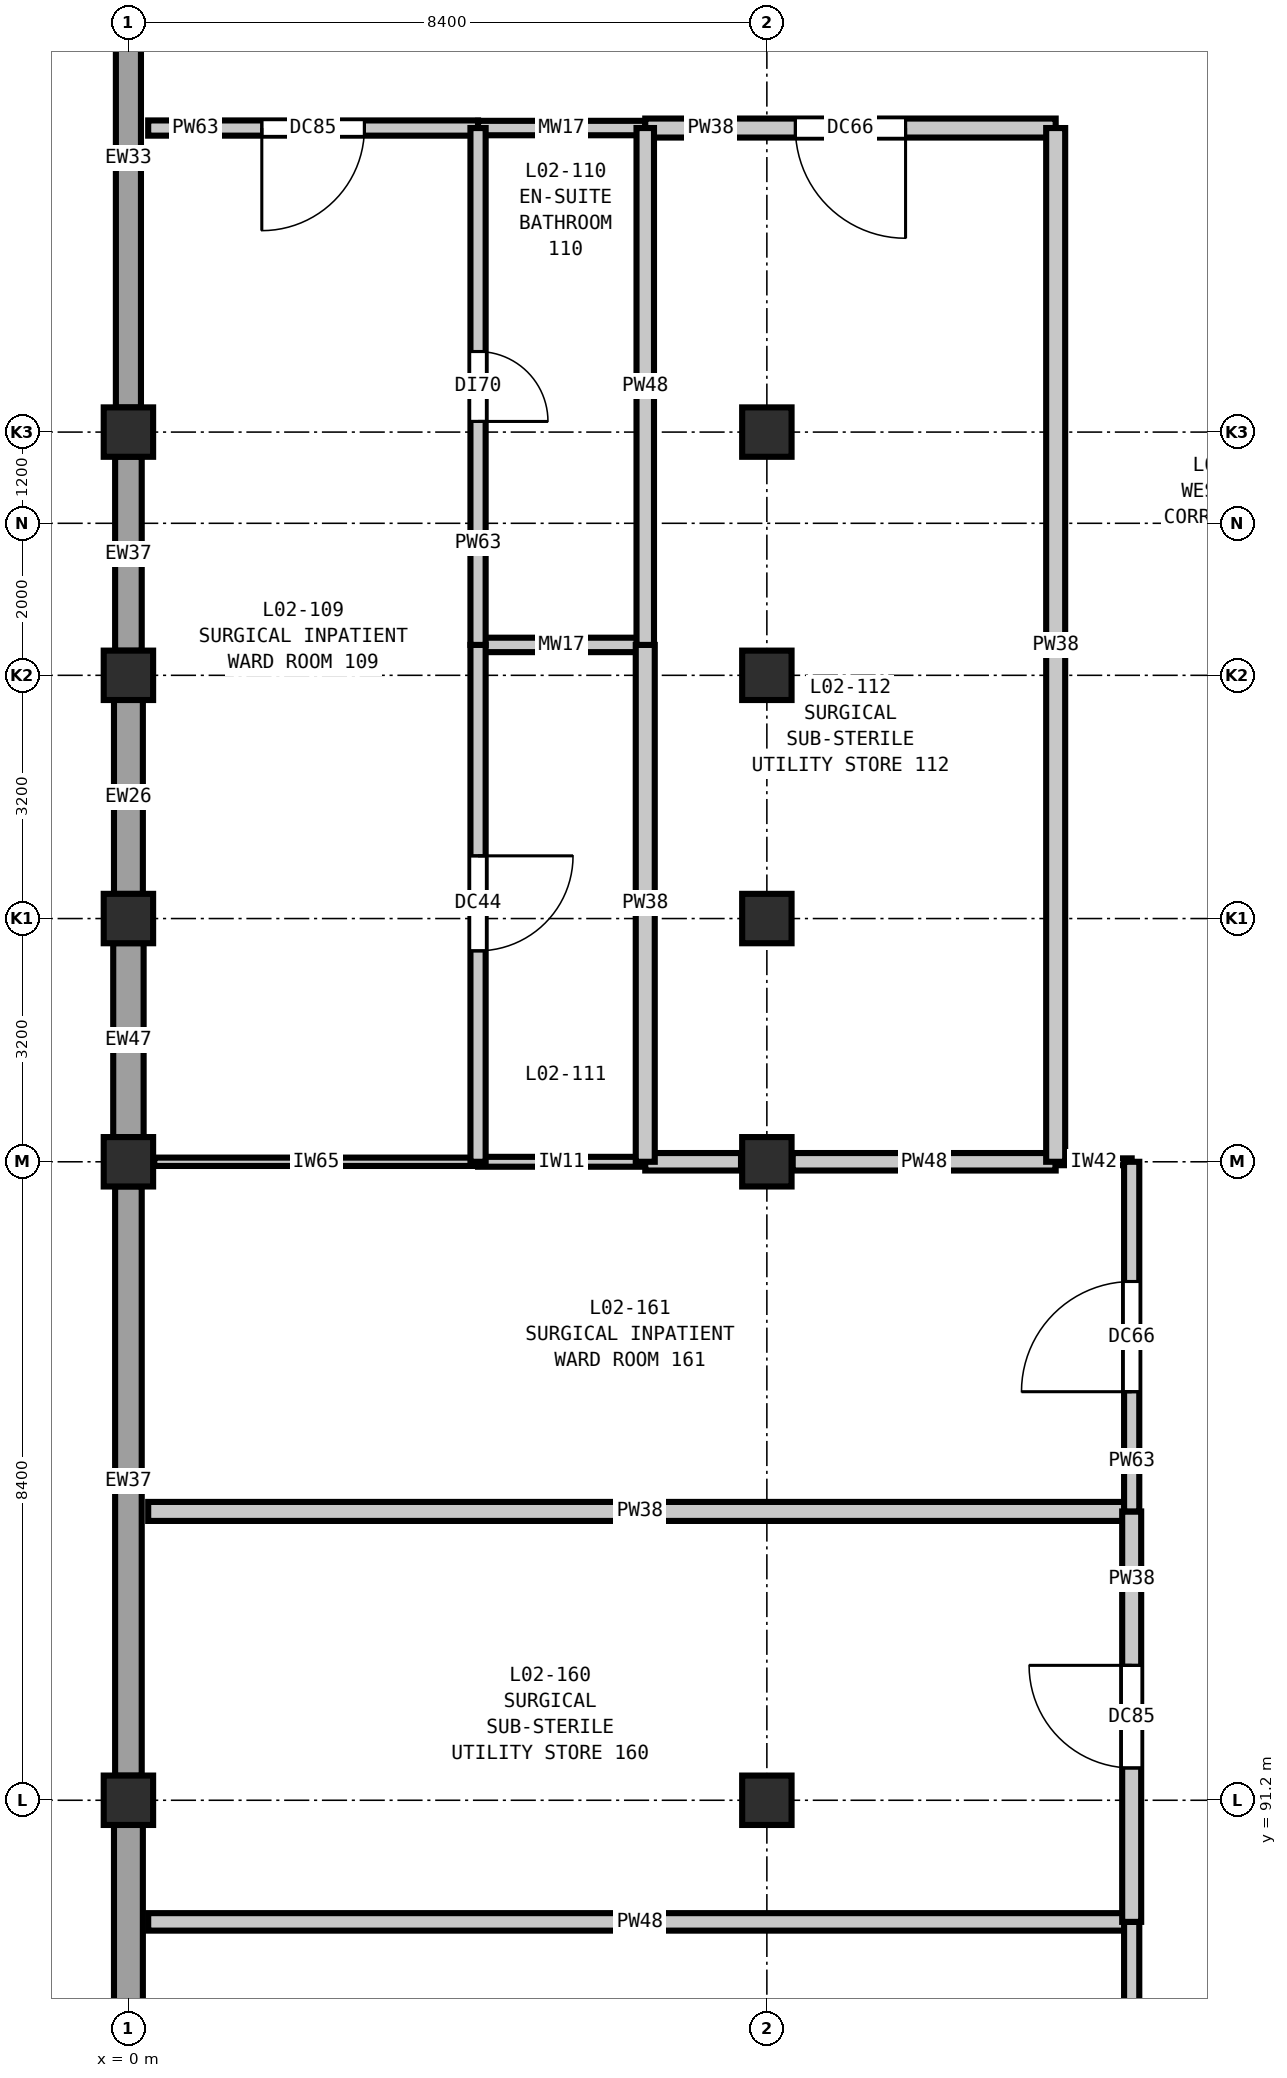
"""IFC4 building model, lengths in metres.
Left out: names, types, materials, properties, quantities, classifications, styles, units other than length and angle.
Written with IfcOpenShell. Run it as: python <this file> out.ifc"""

import sys

from ifc_helpers import new_model, si_unit, direction, frame, frame_2d, origin, origin_2d, place, context, subcontext, project, spatial, rectangle, extrude, element, fill, save


model = new_model("IFC4")
c1 = context("Model", 3, precision=1e-05, world=origin(), true_north=direction((0.0, 1.0)))
c2 = subcontext(c1, "Body", "Model", "MODEL_VIEW")
j1 = project(units=[si_unit("LENGTHUNIT", "METRE"), si_unit("PLANEANGLEUNIT", "RADIAN")], contexts=[c1])
p1 = place(None, origin())
s1 = spatial("IfcSite", under=j1, at=p1, CompositionType="ELEMENT")
p2 = place(p1, origin())
s2 = spatial("IfcBuilding", under=s1, at=p2, CompositionType="ELEMENT")
p3 = place(p2, frame((0.0, 0.0, 10.8)))
s3 = spatial("IfcBuildingStorey", under=s2, at=p3, CompositionType="ELEMENT", Elevation=10.8)
for number, where, z_axis, x_axis in (
    (1, (0.0, 91.2, 0.0), (0.0, 0.0, 1.0), (1.0, 0.0, 0.0)),
    (2, (0.0, 99.6, 0.0), (0.0, 0.0, 1.0), (1.0, 0.0, 0.0)),
    (3, (0.0, 102.8, 0.0), (0.0, 0.0, 1.0), (1.0, 0.0, 0.0)),
    (4, (0.0, 106.0, 0.0), (0.0, 0.0, 1.0), (1.0, 0.0, 0.0)),
    (5, (0.0, 109.2, 0.0), (0.0, 0.0, 1.0), (1.0, 0.0, 0.0)),
    (6, (8.4, 91.2, 0.0), (0.0, 0.0, 1.0), (1.0, 0.0, 0.0)),
    (7, (8.4, 99.6, 0.0), (0.0, 0.0, 1.0), (1.0, 0.0, 0.0)),
    (8, (8.4, 102.8, 0.0), (0.0, 0.0, 1.0), (1.0, 0.0, 0.0)),
    (9, (8.4, 106.0, 0.0), (0.0, 0.0, 1.0), (1.0, 0.0, 0.0)),
    (10, (8.4, 109.2, 0.0), (0.0, 0.0, 1.0), (1.0, 0.0, 0.0)),
):
    element("IfcColumn", number, at=place(p3, frame(where, z_axis=z_axis, x_axis=x_axis)), inside=s3, PredefinedType="COLUMN", context=c2, shape_type="SweptSolid", body=[
        extrude(rectangle(XDim=0.65, YDim=0.65, at=origin_2d()), origin(), (0.0, 0.0, 1.0), 5.4),
    ])
p4 = place(p3, frame((0.0, 99.923, 0.0), z_axis=(0.0, 0.0, 1.0), x_axis=(0.0, 1.0, 0.0)))
e11 = element("IfcWall", 11, at=p4, inside=s3, PredefinedType="SOLIDWALL", context=c2, shape_type="SweptSolid", body=[
    extrude(rectangle(XDim=2.554, YDim=0.4, at=frame_2d((1.277, 0.0))), origin(), (0.0, 0.0, 1.0), 4.68),
])
p5 = place(p3, frame((0.0, 103.123, 0.0), z_axis=(0.0, 0.0, 1.0), x_axis=(0.0, 1.0, 0.0)))
e12 = element("IfcWall", 12, at=p5, inside=s3, PredefinedType="SOLIDWALL", context=c2, shape_type="SweptSolid", body=[
    extrude(rectangle(XDim=2.554, YDim=0.38, at=frame_2d((1.277, 0.0))), origin(), (0.0, 0.0, 1.0), 4.68),
])
p6 = place(p3, frame((0.0, 106.323, 0.0), z_axis=(0.0, 0.0, 1.0), x_axis=(0.0, 1.0, 0.0)))
e13 = element("IfcWall", 13, at=p6, inside=s3, PredefinedType="SOLIDWALL", context=c2, shape_type="SweptSolid", body=[
    extrude(rectangle(XDim=2.554, YDim=0.35, at=frame_2d((1.277, 0.0))), origin(), (0.0, 0.0, 1.0), 4.68),
])
p7 = place(p3, frame((0.0, 109.523, 0.0), z_axis=(0.0, 0.0, 1.0), x_axis=(0.0, 1.0, 0.0)))
e14 = element("IfcWall", 14, at=p7, inside=s3, PredefinedType="SOLIDWALL", context=c2, shape_type="SweptSolid", body=[
    extrude(rectangle(XDim=6.554, YDim=0.33, at=frame_2d((3.277, 0.0))), origin(), (0.0, 0.0, 1.0), 4.68),
])
p8 = place(p3, frame((0.0, 83.098, 0.0), z_axis=(0.0, 0.0, 1.0), x_axis=(0.0, 1.0, 0.0)))
e15 = element("IfcWall", 15, at=p8, inside=s3, PredefinedType="SOLIDWALL", context=c2, shape_type="SweptSolid", body=[
    extrude(rectangle(XDim=7.779, YDim=0.38, at=frame_2d((3.89, 0.0))), origin(), (0.0, 0.0, 1.0), 4.68),
])
p9 = place(p8, frame((3.014, 0.0, 0.9)))
e16 = element("IfcOpeningElement", 16, at=p9, cuts=e15, PredefinedType="OPENING", context=c2, shape_type="SweptSolid", body=[
    extrude(rectangle(XDim=1.75, YDim=1.75, at=frame_2d((0.875, 0.875))), frame((0.0, 0.2, 0.0), z_axis=(0.0, -1.0, 0.0), x_axis=(1.0, 0.0, 0.0)), (0.0, 0.0, 1.0), 0.4),
])
p10 = place(p3, frame((0.0, 91.523, 0.0), z_axis=(0.0, 0.0, 1.0), x_axis=(0.0, 1.0, 0.0)))
e17 = element("IfcWall", 17, at=p10, inside=s3, PredefinedType="SOLIDWALL", context=c2, shape_type="SweptSolid", body=[
    extrude(rectangle(XDim=7.754, YDim=0.35, at=frame_2d((3.877, 0.0))), origin(), (0.0, 0.0, 1.0), 4.68),
])
p11 = place(p3, frame((0.26, 89.6, 0.0), z_axis=(0.0, 0.0, 1.0), x_axis=(1.0, 0.0, 0.0)))
e18 = element("IfcWall", 18, at=p11, inside=s3, PredefinedType="PARTITIONING", context=c2, shape_type="SweptSolid", body=[
    extrude(rectangle(XDim=12.94, YDim=0.23, at=frame_2d((6.47, 0.0))), origin(), (0.0, 0.0, 1.0), 5.07),
])
p12 = place(p3, frame((0.26, 95.0, 0.0), z_axis=(0.0, 0.0, 1.0), x_axis=(1.0, 0.0, 0.0)))
e19 = element("IfcWall", 19, at=p12, inside=s3, PredefinedType="PARTITIONING", context=c2, shape_type="SweptSolid", body=[
    extrude(rectangle(XDim=12.94, YDim=0.25, at=frame_2d((6.47, 0.0))), origin(), (0.0, 0.0, 1.0), 5.07),
])
p13 = place(p3, frame((0.34, 99.6, 0.0), z_axis=(0.0, 0.0, 1.0), x_axis=(1.0, 0.0, 0.0)))
e20 = element("IfcWall", 20, at=p13, inside=s3, PredefinedType="PARTITIONING", context=c2, shape_type="SweptSolid", body=[
    extrude(rectangle(XDim=4.26, YDim=0.11, at=frame_2d((2.13, 0.0))), origin(), (0.0, 0.0, 1.0), 4.735),
])
p14 = place(p3, frame((4.6, 99.6, 0.0), z_axis=(0.0, 0.0, 1.0), x_axis=(1.0, 0.0, 0.0)))
e21 = element("IfcWall", 21, at=p14, inside=s3, PredefinedType="PARTITIONING", context=c2, shape_type="SweptSolid", body=[
    extrude(rectangle(XDim=2.2, YDim=0.13, at=frame_2d((1.1, 0.0))), origin(), (0.0, 0.0, 1.0), 4.735),
])
p15 = place(p3, frame((8.74, 99.6, 0.0), z_axis=(0.0, 0.0, 1.0), x_axis=(1.0, 0.0, 0.0)))
e22 = element("IfcWall", 22, at=p15, inside=s3, PredefinedType="PARTITIONING", context=c2, shape_type="SweptSolid", body=[
    extrude(rectangle(XDim=3.46, YDim=0.23, at=frame_2d((1.73, 0.0))), origin(), (0.0, 0.0, 1.0), 4.735),
])
p16 = place(p3, frame((6.8, 99.6, 0.0), z_axis=(0.0, 0.0, 1.0), x_axis=(1.0, 0.0, 0.0)))
e23 = element("IfcWall", 23, at=p16, inside=s3, PredefinedType="PARTITIONING", context=c2, shape_type="SweptSolid", body=[
    extrude(rectangle(XDim=1.26, YDim=0.23, at=frame_2d((0.63, 0.0))), origin(), (0.0, 0.0, 1.0), 4.735),
])
p17 = place(p3, frame((12.2, 99.6, 0.0), z_axis=(0.0, 0.0, 1.0), x_axis=(1.0, 0.0, 0.0)))
e24 = element("IfcWall", 24, at=p17, inside=s3, PredefinedType="PARTITIONING", context=c2, shape_type="SweptSolid", body=[
    extrude(rectangle(XDim=1.0, YDim=0.09, at=frame_2d((0.5, 0.0))), origin(), (0.0, 0.0, 1.0), 4.735),
])
p18 = place(p3, frame((4.6, 106.4, 0.0), z_axis=(0.0, 0.0, 1.0), x_axis=(1.0, 0.0, 0.0)))
e25 = element("IfcWall", 25, at=p18, inside=s3, PredefinedType="PLUMBINGWALL", context=c2, shape_type="SweptSolid", body=[
    extrude(rectangle(XDim=2.2, YDim=0.19, at=frame_2d((1.1, 0.0))), origin(), (0.0, 0.0, 1.0), 5.07),
])
p19 = place(p3, frame((0.26, 113.2, 0.0), z_axis=(0.0, 0.0, 1.0), x_axis=(1.0, 0.0, 0.0)))
e26 = element("IfcWall", 26, at=p19, inside=s3, PredefinedType="PARTITIONING", context=c2, shape_type="SweptSolid", body=[
    extrude(rectangle(XDim=4.34, YDim=0.2, at=frame_2d((2.17, 0.0))), origin(), (0.0, 0.0, 1.0), 5.07),
])
p20 = place(p19, frame((1.495, 0.0, 0.0)))
e27 = element("IfcOpeningElement", 27, at=p20, cuts=e26, PredefinedType="OPENING", context=c2, shape_type="SweptSolid", body=[
    extrude(rectangle(XDim=1.35, YDim=2.2, at=frame_2d((0.675, 1.1))), frame((0.0, 0.11, 0.0), z_axis=(0.0, -1.0, 0.0), x_axis=(1.0, 0.0, 0.0)), (0.0, 0.0, 1.0), 0.22),
])
p21 = place(p3, frame((4.6, 113.2, 0.0), z_axis=(0.0, 0.0, 1.0), x_axis=(1.0, 0.0, 0.0)))
e28 = element("IfcWall", 28, at=p21, inside=s3, PredefinedType="PLUMBINGWALL", context=c2, shape_type="SweptSolid", body=[
    extrude(rectangle(XDim=2.2, YDim=0.19, at=frame_2d((1.1, 0.0))), origin(), (0.0, 0.0, 1.0), 5.07),
])
p22 = place(p3, frame((6.8, 113.2, 0.0), z_axis=(0.0, 0.0, 1.0), x_axis=(1.0, 0.0, 0.0)))
e29 = element("IfcWall", 29, at=p22, inside=s3, PredefinedType="PARTITIONING", context=c2, shape_type="SweptSolid", body=[
    extrude(rectangle(XDim=5.4, YDim=0.25, at=frame_2d((2.7, 0.0))), origin(), (0.0, 0.0, 1.0), 5.07),
])
p23 = place(p22, frame((1.975, 0.0, 0.0)))
e30 = element("IfcOpeningElement", 30, at=p23, cuts=e29, PredefinedType="OPENING", context=c2, shape_type="SweptSolid", body=[
    extrude(rectangle(XDim=1.45, YDim=2.25, at=frame_2d((0.725, 1.125))), frame((0.0, 0.135, 0.0), z_axis=(0.0, -1.0, 0.0), x_axis=(1.0, 0.0, 0.0)), (0.0, 0.0, 1.0), 0.27),
])
p24 = place(p3, frame((4.6, 99.6, 0.0), z_axis=(0.0, 0.0, 1.0), x_axis=(0.0, 1.0, 0.0)))
e31 = element("IfcWall", 31, at=p24, inside=s3, PredefinedType="PARTITIONING", context=c2, shape_type="SweptSolid", body=[
    extrude(rectangle(XDim=6.8, YDim=0.2, at=frame_2d((3.4, 0.0))), origin(), (0.0, 0.0, 1.0), 5.07),
])
p25 = place(p24, frame((2.775, 0.0, 0.0)))
e32 = element("IfcOpeningElement", 32, at=p25, cuts=e31, PredefinedType="OPENING", context=c2, shape_type="SweptSolid", body=[
    extrude(rectangle(XDim=1.25, YDim=2.15, at=frame_2d((0.625, 1.075))), frame((0.0, 0.11, 0.0), z_axis=(0.0, -1.0, 0.0), x_axis=(1.0, 0.0, 0.0)), (0.0, 0.0, 1.0), 0.22),
])
p26 = place(p3, frame((4.6, 106.4, 0.0), z_axis=(0.0, 0.0, 1.0), x_axis=(0.0, 1.0, 0.0)))
e33 = element("IfcWall", 33, at=p26, inside=s3, PredefinedType="PARTITIONING", context=c2, shape_type="SweptSolid", body=[
    extrude(rectangle(XDim=6.8, YDim=0.2, at=frame_2d((3.4, 0.0))), origin(), (0.0, 0.0, 1.0), 5.07),
])
p27 = place(p26, frame((2.94, 0.0, 0.0)))
e34 = element("IfcOpeningElement", 34, at=p27, cuts=e33, PredefinedType="OPENING", context=c2, shape_type="SweptSolid", body=[
    extrude(rectangle(XDim=0.92, YDim=2.1, at=frame_2d((0.46, 1.05))), frame((0.0, 0.11, 0.0), z_axis=(0.0, -1.0, 0.0), x_axis=(1.0, 0.0, 0.0)), (0.0, 0.0, 1.0), 0.22),
])
p28 = place(p3, frame((6.8, 99.6, 0.0), z_axis=(0.0, 0.0, 1.0), x_axis=(0.0, 1.0, 0.0)))
e35 = element("IfcWall", 35, at=p28, inside=s3, PredefinedType="PARTITIONING", context=c2, shape_type="SweptSolid", body=[
    extrude(rectangle(XDim=6.8, YDim=0.25, at=frame_2d((3.4, 0.0))), origin(), (0.0, 0.0, 1.0), 5.07),
])
p29 = place(p3, frame((6.8, 106.4, 0.0), z_axis=(0.0, 0.0, 1.0), x_axis=(0.0, 1.0, 0.0)))
e36 = element("IfcWall", 36, at=p29, inside=s3, PredefinedType="PARTITIONING", context=c2, shape_type="SweptSolid", body=[
    extrude(rectangle(XDim=6.8, YDim=0.23, at=frame_2d((3.4, 0.0))), origin(), (0.0, 0.0, 1.0), 5.07),
])
p30 = place(p3, frame((12.2, 99.6, 0.0), z_axis=(0.0, 0.0, 1.0), x_axis=(0.0, 1.0, 0.0)))
e37 = element("IfcWall", 37, at=p30, inside=s3, PredefinedType="PARTITIONING", context=c2, shape_type="SweptSolid", body=[
    extrude(rectangle(XDim=13.6, YDim=0.25, at=frame_2d((6.8, 0.0))), origin(), (0.0, 0.0, 1.0), 5.07),
])
p31 = place(p3, frame((13.2, 82.8, 0.0), z_axis=(0.0, 0.0, 1.0), x_axis=(0.0, 1.0, 0.0)))
e38 = element("IfcWall", 38, at=p31, inside=s3, PredefinedType="PARTITIONING", context=c2, shape_type="SweptSolid", body=[
    extrude(rectangle(XDim=6.8, YDim=0.2, at=frame_2d((3.4, 0.0))), origin(), (0.0, 0.0, 1.0), 5.07),
])
p32 = place(p31, frame((2.75, 0.0, 0.0)))
e39 = element("IfcOpeningElement", 39, at=p32, cuts=e38, PredefinedType="OPENING", context=c2, shape_type="SweptSolid", body=[
    extrude(rectangle(XDim=1.3, YDim=2.2, at=frame_2d((0.65, 1.1))), frame((0.0, 0.11, 0.0), z_axis=(0.0, -1.0, 0.0), x_axis=(1.0, 0.0, 0.0)), (0.0, 0.0, 1.0), 0.22),
])
p33 = place(p3, frame((13.2, 89.6, 0.0), z_axis=(0.0, 0.0, 1.0), x_axis=(0.0, 1.0, 0.0)))
e40 = element("IfcWall", 40, at=p33, inside=s3, PredefinedType="PARTITIONING", context=c2, shape_type="SweptSolid", body=[
    extrude(rectangle(XDim=5.4, YDim=0.25, at=frame_2d((2.7, 0.0))), origin(), (0.0, 0.0, 1.0), 5.07),
])
p34 = place(p33, frame((2.025, 0.0, 0.0)))
e41 = element("IfcOpeningElement", 41, at=p34, cuts=e40, PredefinedType="OPENING", context=c2, shape_type="SweptSolid", body=[
    extrude(rectangle(XDim=1.35, YDim=2.2, at=frame_2d((0.675, 1.1))), frame((0.0, 0.135, 0.0), z_axis=(0.0, -1.0, 0.0), x_axis=(1.0, 0.0, 0.0)), (0.0, 0.0, 1.0), 0.27),
])
p35 = place(p3, frame((13.2, 95.0, 0.0), z_axis=(0.0, 0.0, 1.0), x_axis=(0.0, 1.0, 0.0)))
e42 = element("IfcWall", 42, at=p35, inside=s3, PredefinedType="PARTITIONING", context=c2, shape_type="SweptSolid", body=[
    extrude(rectangle(XDim=4.6, YDim=0.2, at=frame_2d((2.3, 0.0))), origin(), (0.0, 0.0, 1.0), 5.07),
])
p36 = place(p35, frame((1.575, 0.0, 0.0)))
e43 = element("IfcOpeningElement", 43, at=p36, cuts=e42, PredefinedType="OPENING", context=c2, shape_type="SweptSolid", body=[
    extrude(rectangle(XDim=1.45, YDim=2.25, at=frame_2d((0.725, 1.125))), frame((0.0, 0.11, 0.0), z_axis=(0.0, -1.0, 0.0), x_axis=(1.0, 0.0, 0.0)), (0.0, 0.0, 1.0), 0.22),
])
p37 = place(p20, frame((1.35, 0.0, 0.0), z_axis=(0.0, 0.0, 1.0), x_axis=(-1.0, 0.0, 0.0)))
e44 = element("IfcDoor", 44, at=p37, inside=s3, OperationType="SINGLE_SWING_RIGHT", PredefinedType="DOOR", context=c2, shape_type="SweptSolid", body=[
    extrude(rectangle(XDim=1.35, YDim=2.2, at=frame_2d((0.675, 1.1))), frame((0.0, 0.025, 0.0), z_axis=(0.0, -1.0, 0.0), x_axis=(1.0, 0.0, 0.0)), (0.0, 0.0, 1.0), 0.05),
])
fill(e27, e44)
p38 = place(p23, frame((1.45, 0.0, 0.0), z_axis=(0.0, 0.0, 1.0), x_axis=(-1.0, 0.0, 0.0)))
e45 = element("IfcDoor", 45, at=p38, inside=s3, OperationType="SINGLE_SWING_LEFT", PredefinedType="DOOR", context=c2, shape_type="SweptSolid", body=[
    extrude(rectangle(XDim=1.45, YDim=2.25, at=frame_2d((0.725, 1.125))), frame((0.0, 0.025, 0.0), z_axis=(0.0, -1.0, 0.0), x_axis=(1.0, 0.0, 0.0)), (0.0, 0.0, 1.0), 0.05),
])
fill(e30, e45)
p39 = place(p25, frame((1.25, 0.0, 0.0), z_axis=(0.0, 0.0, 1.0), x_axis=(-1.0, 0.0, 0.0)))
e46 = element("IfcDoor", 46, at=p39, inside=s3, OperationType="SINGLE_SWING_LEFT", PredefinedType="DOOR", context=c2, shape_type="SweptSolid", body=[
    extrude(rectangle(XDim=1.25, YDim=2.15, at=frame_2d((0.625, 1.075))), frame((0.0, 0.025, 0.0), z_axis=(0.0, -1.0, 0.0), x_axis=(1.0, 0.0, 0.0)), (0.0, 0.0, 1.0), 0.05),
])
fill(e32, e46)
p40 = place(p27, frame((0.92, 0.0, 0.0), z_axis=(0.0, 0.0, 1.0), x_axis=(-1.0, 0.0, 0.0)))
e47 = element("IfcDoor", 47, at=p40, inside=s3, OperationType="SINGLE_SWING_RIGHT", PredefinedType="DOOR", context=c2, shape_type="SweptSolid", body=[
    extrude(rectangle(XDim=0.92, YDim=2.1, at=frame_2d((0.46, 1.05))), frame((0.0, 0.025, 0.0), z_axis=(0.0, -1.0, 0.0), x_axis=(1.0, 0.0, 0.0)), (0.0, 0.0, 1.0), 0.05),
])
fill(e34, e47)
p41 = place(p34, origin())
e48 = element("IfcDoor", 48, at=p41, inside=s3, OperationType="SINGLE_SWING_RIGHT", PredefinedType="DOOR", context=c2, shape_type="SweptSolid", body=[
    extrude(rectangle(XDim=1.35, YDim=2.2, at=frame_2d((0.675, 1.1))), frame((0.0, 0.025, 0.0), z_axis=(0.0, -1.0, 0.0), x_axis=(1.0, 0.0, 0.0)), (0.0, 0.0, 1.0), 0.05),
])
fill(e41, e48)
p42 = place(p36, origin())
e49 = element("IfcDoor", 49, at=p42, inside=s3, OperationType="SINGLE_SWING_LEFT", PredefinedType="DOOR", context=c2, shape_type="SweptSolid", body=[
    extrude(rectangle(XDim=1.45, YDim=2.25, at=frame_2d((0.725, 1.125))), frame((0.0, 0.025, 0.0), z_axis=(0.0, -1.0, 0.0), x_axis=(1.0, 0.0, 0.0)), (0.0, 0.0, 1.0), 0.05),
])
fill(e43, e49)
save(model, sys.argv[1])
